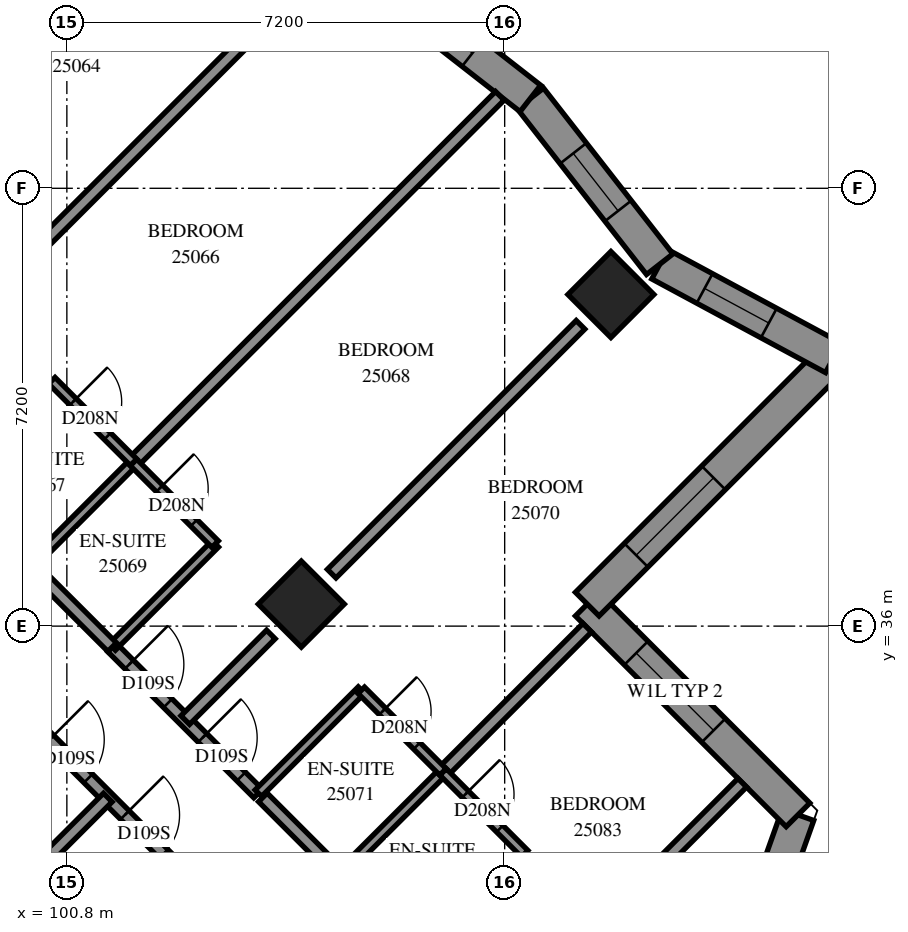
"""IFC4 building model, lengths in metres.
Left out: names, types, materials, properties, quantities, classifications, styles, units other than length and angle.
Written with IfcOpenShell. Run it as: python <this file> out.ifc"""

import sys

from ifc_helpers import new_model, si_unit, direction, frame, frame_2d, origin, origin_2d, place, context, subcontext, project, spatial, polyline, rectangle, outline, extrude, element, fill, save


model = new_model("IFC4")
c1 = context("Model", 3, precision=1e-05, world=origin(), true_north=direction((0.0, 1.0)))
c2 = subcontext(c1, "Body", "Model", "MODEL_VIEW")
j1 = project(units=[si_unit("LENGTHUNIT", "METRE"), si_unit("PLANEANGLEUNIT", "RADIAN")], contexts=[c1])
p1 = place(None, origin())
s1 = spatial("IfcSite", under=j1, at=p1, CompositionType="ELEMENT")
p2 = place(p1, origin())
s2 = spatial("IfcBuilding", under=s1, at=p2, CompositionType="ELEMENT")
p3 = place(p2, frame((0.0, 0.0, 94.8)))
s3 = spatial("IfcBuildingStorey", under=s2, at=p3, CompositionType="ELEMENT", Elevation=94.8)
for number, where, z_axis, x_axis in (
    (1, (109.747, 41.453, 0.0), (0.0, 0.0, 1.0), (0.707, -0.707, 0.0)),
    (2, (104.656, 36.362, 0.0), (0.0, 0.0, 1.0), (0.707, -0.707, 0.0)),
):
    element("IfcColumn", number, at=place(p3, frame(where, z_axis=z_axis, x_axis=x_axis)), inside=s3, PredefinedType="COLUMN", context=c2, shape_type="SweptSolid", body=[
        extrude(rectangle(XDim=1.0, YDim=1.0, at=origin_2d()), origin(), (0.0, 0.0, 1.0), 3.1),
    ])
p4 = place(p3, frame((111.046, 27.906, 0.0), z_axis=(0.0, 0.0, 1.0), x_axis=(0.3355027217, 0.9420392368, 0.0)))
e3 = element("IfcWall", 3, at=p4, inside=s3, PredefinedType="SOLIDWALL", context=c2, shape_type="SweptSolid", body=[
    extrude(outline(polyline([(-0.125, -0.275), (5.471, -0.275), (5.123, 0.275), (0.125, 0.275), (-0.125, -0.275)])), origin(), (0.0, 0.0, 1.0), 3.1),
])
p5 = place(p4, frame((1.46, 0.0, 0.5)))
e4 = element("IfcOpeningElement", 4, at=p5, cuts=e3, PredefinedType="OPENING", context=c2, shape_type="SweptSolid", body=[
    extrude(rectangle(XDim=1.3, YDim=2.45, at=frame_2d((0.65, 1.225))), frame((0.0, 0.285, 0.0), z_axis=(0.0, -1.0, 0.0), x_axis=(1.0, 0.0, 0.0)), (0.0, 0.0, 1.0), 0.57),
])
p6 = place(p4, frame((2.96, 0.0, 0.5)))
e5 = element("IfcOpeningElement", 5, at=p6, cuts=e3, PredefinedType="OPENING", context=c2, shape_type="SweptSolid", body=[
    extrude(rectangle(XDim=1.3, YDim=2.45, at=frame_2d((0.65, 1.225))), frame((0.0, 0.285, 0.0), z_axis=(0.0, -1.0, 0.0), x_axis=(1.0, 0.0, 0.0)), (0.0, 0.0, 1.0), 0.57),
])
p7 = place(p3, frame((112.824, 32.896, 0.0), z_axis=(0.0, 0.0, 1.0), x_axis=(-0.7071067812, 0.7071067812, 0.0)))
e6 = element("IfcWall", 6, at=p7, inside=s3, PredefinedType="SOLIDWALL", context=c2, shape_type="SweptSolid", body=[
    extrude(outline(polyline([(-0.174, -0.275), (4.626, -0.275), (5.176, 0.275), (0.174, 0.275), (-0.174, -0.275)])), origin(), (0.0, 0.0, 1.0), 3.1),
])
p8 = place(p7, frame((1.964, 0.0, 0.6)))
e7 = element("IfcOpeningElement", 7, at=p8, cuts=e6, PredefinedType="OPENING", context=c2, shape_type="SweptSolid", body=[
    extrude(rectangle(XDim=1.8, YDim=1.9, at=frame_2d((0.9, 0.95))), frame((0.0, 0.285, 0.0), z_axis=(0.0, -1.0, 0.0), x_axis=(1.0, 0.0, 0.0)), (0.0, 0.0, 1.0), 0.57),
])
p9 = place(p3, frame((109.358, 36.362, 0.0), z_axis=(0.0, 0.0, 1.0), x_axis=(0.7071067812, 0.7071067812, 0.0)))
e8 = element("IfcWall", 8, at=p9, inside=s3, PredefinedType="SOLIDWALL", context=c2, shape_type="SweptSolid", body=[
    extrude(outline(polyline([(0.275, -0.275), (6.096, -0.275), (5.357, 0.275), (-0.275, 0.275), (0.275, -0.275)])), origin(), (0.0, 0.0, 1.0), 3.1),
])
p10 = place(p9, frame((1.137, 0.0, 0.6)))
e9 = element("IfcOpeningElement", 9, at=p10, cuts=e8, PredefinedType="OPENING", context=c2, shape_type="SweptSolid", body=[
    extrude(rectangle(XDim=1.8, YDim=1.9, at=frame_2d((0.9, 0.95))), frame((0.0, 0.285, 0.0), z_axis=(0.0, -1.0, 0.0), x_axis=(1.0, 0.0, 0.0)), (0.0, 0.0, 1.0), 0.57),
])
p11 = place(p3, frame((113.407, 40.411, 0.0), z_axis=(0.0, 0.0, 1.0), x_axis=(-0.8802801365, 0.4744542985, 0.0)))
e10 = element("IfcWall", 10, at=p11, inside=s3, PredefinedType="SOLIDWALL", context=c2, shape_type="SweptSolid", body=[
    extrude(outline(polyline([(-0.369, -0.275), (3.189, -0.275), (3.304, 0.275), (0.369, 0.275), (-0.369, -0.275)])), origin(), (0.0, 0.0, 1.0), 3.1),
])
p12 = place(p11, frame((1.208, 0.0, 0.5)))
e11 = element("IfcOpeningElement", 11, at=p12, cuts=e10, PredefinedType="OPENING", context=c2, shape_type="SweptSolid", body=[
    extrude(rectangle(XDim=1.2, YDim=2.45, at=frame_2d((0.6, 1.225))), frame((0.0, 0.285, 0.0), z_axis=(0.0, -1.0, 0.0), x_axis=(1.0, 0.0, 0.0)), (0.0, 0.0, 1.0), 0.57),
])
p13 = place(p3, frame((110.55, 41.951, 0.0), z_axis=(0.0, 0.0, 1.0), x_axis=(-0.6150990344, 0.7884498576, 0.0)))
e12 = element("IfcWall", 12, at=p13, inside=s3, PredefinedType="SOLIDWALL", context=c2, shape_type="SweptSolid", body=[
    extrude(outline(polyline([(0.058, -0.275), (3.492, -0.275), (3.424, 0.275), (-0.058, 0.275), (0.058, -0.275)])), origin(), (0.0, 0.0, 1.0), 3.1),
])
p14 = place(p13, frame((1.112, 0.0, 0.5)))
e13 = element("IfcOpeningElement", 13, at=p14, cuts=e12, PredefinedType="OPENING", context=c2, shape_type="SweptSolid", body=[
    extrude(rectangle(XDim=1.2, YDim=2.45, at=frame_2d((0.6, 1.225))), frame((0.0, 0.285, 0.0), z_axis=(0.0, -1.0, 0.0), x_axis=(1.0, 0.0, 0.0)), (0.0, 0.0, 1.0), 0.57),
])
p15 = place(p3, frame((108.422, 44.678, 0.0), z_axis=(0.0, 0.0, 1.0), x_axis=(-0.788454577, 0.6150929849, 0.0)))
e14 = element("IfcWall", 14, at=p15, inside=s3, PredefinedType="SOLIDWALL", context=c2, shape_type="SweptSolid", body=[
    extrude(outline(polyline([(-0.034, -0.275), (3.401, -0.275), (3.468, 0.275), (0.034, 0.275), (-0.034, -0.275)])), origin(), (0.0, 0.0, 1.0), 3.1),
])
p16 = place(p15, frame((1.21, 0.0, 0.5)))
e15 = element("IfcOpeningElement", 15, at=p16, cuts=e14, PredefinedType="OPENING", context=c2, shape_type="SweptSolid", body=[
    extrude(rectangle(XDim=1.2, YDim=2.45, at=frame_2d((0.6, 1.225))), frame((0.0, 0.285, 0.0), z_axis=(0.0, -1.0, 0.0), x_axis=(1.0, 0.0, 0.0)), (0.0, 0.0, 1.0), 0.57),
])
p17 = place(p3, frame((93.339, 41.309, 0.0), z_axis=(0.0, 0.0, 1.0), x_axis=(0.7071067812, -0.7071067812, 0.0)))
e16 = element("IfcWall", 16, at=p17, inside=s3, PredefinedType="PARTITIONING", context=c2, shape_type="SweptSolid", body=[
    extrude(rectangle(XDim=18.702, YDim=0.2, at=frame_2d((9.351, 0.0))), origin(), (0.0, 0.0, 1.0), 3.1),
])
p18 = place(p17, frame((3.05, 0.0, 0.0)))
e17 = element("IfcOpeningElement", 17, at=p18, cuts=e16, PredefinedType="OPENING", context=c2, shape_type="SweptSolid", body=[
    extrude(rectangle(XDim=0.9, YDim=2.1, at=frame_2d((0.45, 1.05))), frame((0.0, 0.11, 0.0), z_axis=(0.0, -1.0, 0.0), x_axis=(1.0, 0.0, 0.0)), (0.0, 0.0, 1.0), 0.22),
])
p19 = place(p17, frame((4.7, 0.0, 0.0)))
e18 = element("IfcOpeningElement", 18, at=p19, cuts=e16, PredefinedType="OPENING", context=c2, shape_type="SweptSolid", body=[
    extrude(rectangle(XDim=0.9, YDim=2.1, at=frame_2d((0.45, 1.05))), frame((0.0, 0.11, 0.0), z_axis=(0.0, -1.0, 0.0), x_axis=(1.0, 0.0, 0.0)), (0.0, 0.0, 1.0), 0.22),
])
p20 = place(p17, frame((10.149, 0.0, 0.0)))
e19 = element("IfcOpeningElement", 19, at=p20, cuts=e16, PredefinedType="OPENING", context=c2, shape_type="SweptSolid", body=[
    extrude(rectangle(XDim=0.9, YDim=2.1, at=frame_2d((0.45, 1.05))), frame((0.0, 0.11, 0.0), z_axis=(0.0, -1.0, 0.0), x_axis=(1.0, 0.0, 0.0)), (0.0, 0.0, 1.0), 0.22),
])
p21 = place(p17, frame((11.9, 0.0, 0.0)))
e20 = element("IfcOpeningElement", 20, at=p21, cuts=e16, PredefinedType="OPENING", context=c2, shape_type="SweptSolid", body=[
    extrude(rectangle(XDim=0.9, YDim=2.1, at=frame_2d((0.45, 1.05))), frame((0.0, 0.11, 0.0), z_axis=(0.0, -1.0, 0.0), x_axis=(1.0, 0.0, 0.0)), (0.0, 0.0, 1.0), 0.22),
])
p22 = place(p17, frame((17.45, 0.0, 0.0)))
e21 = element("IfcOpeningElement", 21, at=p22, cuts=e16, PredefinedType="OPENING", context=c2, shape_type="SweptSolid", body=[
    extrude(rectangle(XDim=0.9, YDim=2.1, at=frame_2d((0.45, 1.05))), frame((0.0, 0.11, 0.0), z_axis=(0.0, -1.0, 0.0), x_axis=(1.0, 0.0, 0.0)), (0.0, 0.0, 1.0), 0.22),
])
p23 = place(p3, frame((94.615, 42.587, 0.0), z_axis=(0.0, 0.0, 1.0), x_axis=(0.7071067812, 0.7071067812, 0.0)))
e22 = element("IfcWall", 22, at=p23, inside=s3, PredefinedType="PARTITIONING", context=c2, shape_type="SweptSolid", body=[
    extrude(rectangle(XDim=9.198, YDim=0.2, at=frame_2d((4.599, 0.0))), origin(), (0.0, 0.0, 1.0), 3.1),
])
p24 = place(p23, frame((0.248, 0.0, 0.0)))
e23 = element("IfcOpeningElement", 23, at=p24, cuts=e22, PredefinedType="OPENING", context=c2, shape_type="SweptSolid", body=[
    extrude(rectangle(XDim=1.0, YDim=2.1, at=frame_2d((0.5, 1.05))), frame((0.0, 0.11, 0.0), z_axis=(0.0, -1.0, 0.0), x_axis=(1.0, 0.0, 0.0)), (0.0, 0.0, 1.0), 0.22),
])
p25 = place(p3, frame((101.896, 38.698, 0.0), z_axis=(0.0, 0.0, 1.0), x_axis=(0.7072241589, 0.706989384, 0.0)))
e24 = element("IfcWall", 24, at=p25, inside=s3, PredefinedType="PARTITIONING", context=c2, shape_type="SweptSolid", body=[
    extrude(rectangle(XDim=8.519, YDim=0.2, at=frame_2d((4.259, 0.0))), origin(), (0.0, 0.0, 1.0), 3.1),
])
p26 = place(p3, frame((96.805, 43.787, 0.0), z_axis=(0.0, 0.0, 1.0), x_axis=(0.7071126822, 0.7071008801, 0.0)))
e25 = element("IfcWall", 25, at=p26, inside=s3, PredefinedType="PARTITIONING", context=c2, shape_type="SweptSolid", body=[
    extrude(rectangle(XDim=8.473, YDim=0.2, at=frame_2d((4.237, 0.0))), origin(), (0.0, 0.0, 1.0), 3.1),
])
for number, where, z_axis, x_axis in (
    (26, (105.155, 36.863, 0.0), (0.0, 0.0, 1.0), (0.707, 0.707, 0.0)),
    (27, (100.063, 41.953, 0.0), (0.0, 0.0, 1.0), (0.707, 0.707, 0.0)),
):
    element("IfcWall", number, at=place(p3, frame(where, z_axis=z_axis, x_axis=x_axis)), inside=s3, PredefinedType="PARTITIONING", context=c2, shape_type="SweptSolid", body=[
        extrude(rectangle(XDim=5.787, YDim=0.2, at=frame_2d((2.893, 0.0))), origin(), (0.0, 0.0, 1.0), 3.1),
    ])
p27 = place(p3, frame((104.023, 33.184, 0.0), z_axis=(0.0, 0.0, 1.0), x_axis=(0.7071067812, -0.7071067812, 0.0)))
e28 = element("IfcWall", 28, at=p27, inside=s3, PredefinedType="PARTITIONING", context=c2, shape_type="SweptSolid", body=[
    extrude(rectangle(XDim=5.399, YDim=0.2, at=frame_2d((2.7, 0.0))), origin(), (0.0, 0.0, 1.0), 3.1),
])
p28 = place(p27, frame((4.08, 0.0, 0.0)))
e29 = element("IfcOpeningElement", 29, at=p28, cuts=e28, PredefinedType="OPENING", context=c2, shape_type="SweptSolid", body=[
    extrude(rectangle(XDim=0.9, YDim=2.1, at=frame_2d((0.45, 1.05))), frame((0.0, 0.11, 0.0), z_axis=(0.0, -1.0, 0.0), x_axis=(1.0, 0.0, 0.0)), (0.0, 0.0, 1.0), 0.22),
])
p29 = place(p3, frame((101.541, 35.651, 0.0), z_axis=(0.0, 0.0, 1.0), x_axis=(0.7071067812, -0.7071067812, 0.0)))
e30 = element("IfcWall", 30, at=p29, inside=s3, PredefinedType="PARTITIONING", context=c2, shape_type="SweptSolid", body=[
    extrude(rectangle(XDim=3.4, YDim=0.2, at=frame_2d((1.7, 0.0))), origin(), (0.0, 0.0, 1.0), 3.1),
])
p30 = place(p29, frame((0.4, 0.0, 0.0)))
e31 = element("IfcOpeningElement", 31, at=p30, cuts=e30, PredefinedType="OPENING", context=c2, shape_type="SweptSolid", body=[
    extrude(rectangle(XDim=0.9, YDim=2.1, at=frame_2d((0.45, 1.05))), frame((0.0, 0.11, 0.0), z_axis=(0.0, -1.0, 0.0), x_axis=(1.0, 0.0, 0.0)), (0.0, 0.0, 1.0), 0.22),
])
p31 = place(p29, frame((2.105, 0.0, 0.0)))
e32 = element("IfcOpeningElement", 32, at=p31, cuts=e30, PredefinedType="OPENING", context=c2, shape_type="SweptSolid", body=[
    extrude(rectangle(XDim=0.9, YDim=2.1, at=frame_2d((0.45, 1.05))), frame((0.0, 0.11, 0.0), z_axis=(0.0, -1.0, 0.0), x_axis=(1.0, 0.0, 0.0)), (0.0, 0.0, 1.0), 0.22),
])
p32 = place(p3, frame((106.989, 33.605, 0.0), z_axis=(0.0, 0.0, 1.0), x_axis=(0.7071067812, 0.7071067812, 0.0)))
e33 = element("IfcWall", 33, at=p32, inside=s3, PredefinedType="PARTITIONING", context=c2, shape_type="SweptSolid", body=[
    extrude(rectangle(XDim=3.35, YDim=0.2, at=frame_2d((1.675, 0.0))), origin(), (0.0, 0.0, 1.0), 3.1),
])
for number, where, z_axis, x_axis in (
    (34, (100.203, 36.997, 0.0), (0.0, 0.0, 1.0), (0.707, 0.708, 0.0)),
    (35, (105.29, 31.91, 0.0), (0.0, 0.0, 1.0), (0.708, 0.707, 0.0)),
):
    element("IfcWall", number, at=place(p3, frame(where, z_axis=z_axis, x_axis=x_axis)), inside=s3, PredefinedType="PARTITIONING", context=c2, shape_type="SweptSolid", body=[
        extrude(rectangle(XDim=2.4, YDim=0.15, at=frame_2d((1.2, 0.0))), origin(), (0.0, 0.0, 1.0), 3.1),
    ])
for number, where, z_axis, x_axis in (
    (36, (98.857, 38.343, 0.0), (0.0, 0.0, 1.0), (0.707, 0.707, 0.0)),
    (37, (101.545, 35.657, 0.0), (0.0, 0.0, 1.0), (0.707, 0.707, 0.0)),
    (38, (106.635, 30.565, 0.0), (0.0, 0.0, 1.0), (0.707, 0.707, 0.0)),
    (39, (103.949, 33.253, 0.0), (0.0, 0.0, 1.0), (0.707, 0.707, 0.0)),
):
    element("IfcWall", number, at=place(p3, frame(where, z_axis=z_axis, x_axis=x_axis)), inside=s3, PredefinedType="PARTITIONING", context=c2, shape_type="SweptSolid", body=[
        extrude(rectangle(XDim=2.398, YDim=0.15, at=frame_2d((1.199, 0.0))), origin(), (0.0, 0.0, 1.0), 3.1),
    ])
p33 = place(p3, frame((110.251, 31.767, 0.0), z_axis=(0.0, 0.0, 1.0), x_axis=(0.7066584143, 0.7075548639, 0.0)))
e40 = element("IfcWall", 40, at=p33, inside=s3, PredefinedType="PARTITIONING", context=c2, shape_type="SweptSolid", body=[
    extrude(rectangle(XDim=2.343, YDim=0.2, at=frame_2d((1.171, 0.0))), origin(), (0.0, 0.0, 1.0), 3.1),
])
p34 = place(p3, frame((100.063, 31.771, 0.0), z_axis=(0.0, 0.0, 1.0), x_axis=(0.7071067812, 0.7071067812, 0.0)))
e41 = element("IfcWall", 41, at=p34, inside=s3, PredefinedType="PARTITIONING", context=c2, shape_type="SweptSolid", body=[
    extrude(rectangle(XDim=1.994, YDim=0.2, at=frame_2d((0.997, 0.0))), origin(), (0.0, 0.0, 1.0), 3.1),
])
p35 = place(p3, frame((102.747, 34.455, 0.0), z_axis=(0.0, 0.0, 1.0), x_axis=(0.7071067812, 0.7071067812, 0.0)))
e42 = element("IfcWall", 42, at=p35, inside=s3, PredefinedType="PARTITIONING", context=c2, shape_type="SweptSolid", body=[
    extrude(rectangle(XDim=1.991, YDim=0.2, at=frame_2d((0.996, 0.0))), origin(), (0.0, 0.0, 1.0), 3.1),
])
p36 = place(p3, frame((101.894, 38.693, 0.0), z_axis=(0.0, 0.0, 1.0), x_axis=(0.7071067812, -0.7071067812, 0.0)))
e43 = element("IfcWall", 43, at=p36, inside=s3, PredefinedType="PARTITIONING", context=c2, shape_type="SweptSolid", body=[
    extrude(rectangle(XDim=1.901, YDim=0.15, at=frame_2d((0.95, 0.0))), origin(), (0.0, 0.0, 1.0), 3.1),
])
p37 = place(p36, frame((0.608, 0.0, 0.0)))
e44 = element("IfcOpeningElement", 44, at=p37, cuts=e43, PredefinedType="OPENING", context=c2, shape_type="SweptSolid", body=[
    extrude(rectangle(XDim=0.8, YDim=2.1, at=frame_2d((0.4, 1.05))), frame((0.0, 0.085, 0.0), z_axis=(0.0, -1.0, 0.0), x_axis=(1.0, 0.0, 0.0)), (0.0, 0.0, 1.0), 0.17),
])
p38 = place(p3, frame((105.642, 34.944, 0.0), z_axis=(0.0, 0.0, 1.0), x_axis=(0.7071067812, -0.7071067812, 0.0)))
e45 = element("IfcWall", 45, at=p38, inside=s3, PredefinedType="PARTITIONING", context=c2, shape_type="SweptSolid", body=[
    extrude(rectangle(XDim=1.901, YDim=0.15, at=frame_2d((0.95, 0.0))), origin(), (0.0, 0.0, 1.0), 3.1),
])
p39 = place(p38, frame((0.491, 0.0, 0.0)))
e46 = element("IfcOpeningElement", 46, at=p39, cuts=e45, PredefinedType="OPENING", context=c2, shape_type="SweptSolid", body=[
    extrude(rectangle(XDim=0.8, YDim=2.1, at=frame_2d((0.4, 1.05))), frame((0.0, 0.085, 0.0), z_axis=(0.0, -1.0, 0.0), x_axis=(1.0, 0.0, 0.0)), (0.0, 0.0, 1.0), 0.17),
])
p40 = place(p3, frame((100.553, 40.037, 0.0), z_axis=(0.0, 0.0, 1.0), x_axis=(0.7076330979, -0.7065800724, 0.0)))
e47 = element("IfcWall", 47, at=p40, inside=s3, PredefinedType="PARTITIONING", context=c2, shape_type="SweptSolid", body=[
    extrude(rectangle(XDim=1.899, YDim=0.15, at=frame_2d((0.95, 0.0))), origin(), (0.0, 0.0, 1.0), 3.1),
])
p41 = place(p40, frame((0.493, 0.0, 0.0)))
e48 = element("IfcOpeningElement", 48, at=p41, cuts=e47, PredefinedType="OPENING", context=c2, shape_type="SweptSolid", body=[
    extrude(rectangle(XDim=0.8, YDim=2.1, at=frame_2d((0.4, 1.05))), frame((0.0, 0.085, 0.0), z_axis=(0.0, -1.0, 0.0), x_axis=(1.0, 0.0, 0.0)), (0.0, 0.0, 1.0), 0.17),
])
p42 = place(p3, frame((100.201, 36.997, 0.0), z_axis=(0.0, 0.0, 1.0), x_axis=(0.7076330979, -0.7065800724, 0.0)))
e49 = element("IfcWall", 49, at=p42, inside=s3, PredefinedType="PARTITIONING", context=c2, shape_type="SweptSolid", body=[
    extrude(rectangle(XDim=1.899, YDim=0.2, at=frame_2d((0.95, 0.0))), origin(), (0.0, 0.0, 1.0), 3.1),
])
p43 = place(p3, frame((106.987, 33.602, 0.0), z_axis=(0.0, 0.0, 1.0), x_axis=(0.7065800724, -0.7076330979, 0.0)))
e50 = element("IfcWall", 50, at=p43, inside=s3, PredefinedType="PARTITIONING", context=c2, shape_type="SweptSolid", body=[
    extrude(rectangle(XDim=1.899, YDim=0.15, at=frame_2d((0.95, 0.0))), origin(), (0.0, 0.0, 1.0), 3.1),
])
p44 = place(p43, frame((0.519, 0.0, 0.0)))
e51 = element("IfcOpeningElement", 51, at=p44, cuts=e50, PredefinedType="OPENING", context=c2, shape_type="SweptSolid", body=[
    extrude(rectangle(XDim=0.8, YDim=2.1, at=frame_2d((0.4, 1.05))), frame((0.0, 0.085, 0.0), z_axis=(0.0, -1.0, 0.0), x_axis=(1.0, 0.0, 0.0)), (0.0, 0.0, 1.0), 0.17),
])
p45 = place(p8, origin())
e52 = element("IfcWindow", 52, at=p45, inside=s3, PartitioningType="SINGLE_PANEL", PredefinedType="WINDOW", context=c2, shape_type="SweptSolid", body=[
    extrude(rectangle(XDim=1.8, YDim=1.9, at=frame_2d((0.9, 0.95))), frame((0.0, 0.155, 0.0), z_axis=(0.0, -1.0, 0.0), x_axis=(1.0, 0.0, 0.0)), (0.0, 0.0, 1.0), 0.06),
])
fill(e7, e52)
p46 = place(p10, origin())
e53 = element("IfcWindow", 53, at=p46, inside=s3, PartitioningType="SINGLE_PANEL", PredefinedType="WINDOW", context=c2, shape_type="SweptSolid", body=[
    extrude(rectangle(XDim=1.8, YDim=1.9, at=frame_2d((0.9, 0.95))), frame((0.0, 0.155, 0.0), z_axis=(0.0, -1.0, 0.0), x_axis=(1.0, 0.0, 0.0)), (0.0, 0.0, 1.0), 0.06),
])
fill(e9, e53)
p47 = place(p12, origin())
e54 = element("IfcWindow", 54, at=p47, inside=s3, PartitioningType="SINGLE_PANEL", PredefinedType="WINDOW", context=c2, shape_type="SweptSolid", body=[
    extrude(rectangle(XDim=1.2, YDim=2.45, at=frame_2d((0.6, 1.225))), frame((0.0, 0.155, 0.0), z_axis=(0.0, -1.0, 0.0), x_axis=(1.0, 0.0, 0.0)), (0.0, 0.0, 1.0), 0.06),
])
fill(e11, e54)
p48 = place(p14, origin())
e55 = element("IfcWindow", 55, at=p48, inside=s3, PartitioningType="SINGLE_PANEL", PredefinedType="WINDOW", context=c2, shape_type="SweptSolid", body=[
    extrude(rectangle(XDim=1.2, YDim=2.45, at=frame_2d((0.6, 1.225))), frame((0.0, 0.155, 0.0), z_axis=(0.0, -1.0, 0.0), x_axis=(1.0, 0.0, 0.0)), (0.0, 0.0, 1.0), 0.06),
])
fill(e13, e55)
p49 = place(p16, origin())
e56 = element("IfcWindow", 56, at=p49, inside=s3, PartitioningType="SINGLE_PANEL", PredefinedType="WINDOW", context=c2, shape_type="SweptSolid", body=[
    extrude(rectangle(XDim=1.2, YDim=2.45, at=frame_2d((0.6, 1.225))), frame((0.0, 0.155, 0.0), z_axis=(0.0, -1.0, 0.0), x_axis=(1.0, 0.0, 0.0)), (0.0, 0.0, 1.0), 0.06),
])
fill(e15, e56)
p50 = place(p41, origin())
e57 = element("IfcDoor", 57, at=p50, inside=s3, OperationType="SINGLE_SWING_RIGHT", PredefinedType="DOOR", context=c2, shape_type="SweptSolid", body=[
    extrude(rectangle(XDim=0.8, YDim=2.1, at=frame_2d((0.4, 1.05))), frame((0.0, 0.025, 0.0), z_axis=(0.0, -1.0, 0.0), x_axis=(1.0, 0.0, 0.0)), (0.0, 0.0, 1.0), 0.05),
])
fill(e48, e57)
p51 = place(p30, origin())
e58 = element("IfcDoor", 58, at=p51, inside=s3, OperationType="SINGLE_SWING_RIGHT", PredefinedType="DOOR", context=c2, shape_type="SweptSolid", body=[
    extrude(rectangle(XDim=0.9, YDim=2.1, at=frame_2d((0.45, 1.05))), frame((0.0, 0.025, 0.0), z_axis=(0.0, -1.0, 0.0), x_axis=(1.0, 0.0, 0.0)), (0.0, 0.0, 1.0), 0.05),
])
fill(e31, e58)
p52 = place(p37, origin())
e59 = element("IfcDoor", 59, at=p52, inside=s3, OperationType="SINGLE_SWING_RIGHT", PredefinedType="DOOR", context=c2, shape_type="SweptSolid", body=[
    extrude(rectangle(XDim=0.8, YDim=2.1, at=frame_2d((0.4, 1.05))), frame((0.0, 0.025, 0.0), z_axis=(0.0, -1.0, 0.0), x_axis=(1.0, 0.0, 0.0)), (0.0, 0.0, 1.0), 0.05),
])
fill(e44, e59)
p53 = place(p31, origin())
e60 = element("IfcDoor", 60, at=p53, inside=s3, OperationType="SINGLE_SWING_LEFT", PredefinedType="DOOR", context=c2, shape_type="SweptSolid", body=[
    extrude(rectangle(XDim=0.9, YDim=2.1, at=frame_2d((0.45, 1.05))), frame((0.0, 0.025, 0.0), z_axis=(0.0, -1.0, 0.0), x_axis=(1.0, 0.0, 0.0)), (0.0, 0.0, 1.0), 0.05),
])
fill(e32, e60)
p54 = place(p39, origin())
e61 = element("IfcDoor", 61, at=p54, inside=s3, OperationType="SINGLE_SWING_RIGHT", PredefinedType="DOOR", context=c2, shape_type="SweptSolid", body=[
    extrude(rectangle(XDim=0.8, YDim=2.1, at=frame_2d((0.4, 1.05))), frame((0.0, 0.025, 0.0), z_axis=(0.0, -1.0, 0.0), x_axis=(1.0, 0.0, 0.0)), (0.0, 0.0, 1.0), 0.05),
])
fill(e46, e61)
p55 = place(p20, origin())
e62 = element("IfcDoor", 62, at=p55, inside=s3, OperationType="SINGLE_SWING_LEFT", PredefinedType="DOOR", context=c2, shape_type="SweptSolid", body=[
    extrude(rectangle(XDim=0.9, YDim=2.1, at=frame_2d((0.45, 1.05))), frame((0.0, 0.025, 0.0), z_axis=(0.0, -1.0, 0.0), x_axis=(1.0, 0.0, 0.0)), (0.0, 0.0, 1.0), 0.05),
])
fill(e19, e62)
p56 = place(p21, origin())
e63 = element("IfcDoor", 63, at=p56, inside=s3, OperationType="SINGLE_SWING_RIGHT", PredefinedType="DOOR", context=c2, shape_type="SweptSolid", body=[
    extrude(rectangle(XDim=0.9, YDim=2.1, at=frame_2d((0.45, 1.05))), frame((0.0, 0.025, 0.0), z_axis=(0.0, -1.0, 0.0), x_axis=(1.0, 0.0, 0.0)), (0.0, 0.0, 1.0), 0.05),
])
fill(e20, e63)
p57 = place(p44, origin())
e64 = element("IfcDoor", 64, at=p57, inside=s3, OperationType="SINGLE_SWING_RIGHT", PredefinedType="DOOR", context=c2, shape_type="SweptSolid", body=[
    extrude(rectangle(XDim=0.8, YDim=2.1, at=frame_2d((0.4, 1.05))), frame((0.0, 0.025, 0.0), z_axis=(0.0, -1.0, 0.0), x_axis=(1.0, 0.0, 0.0)), (0.0, 0.0, 1.0), 0.05),
])
fill(e51, e64)
save(model, sys.argv[1])
